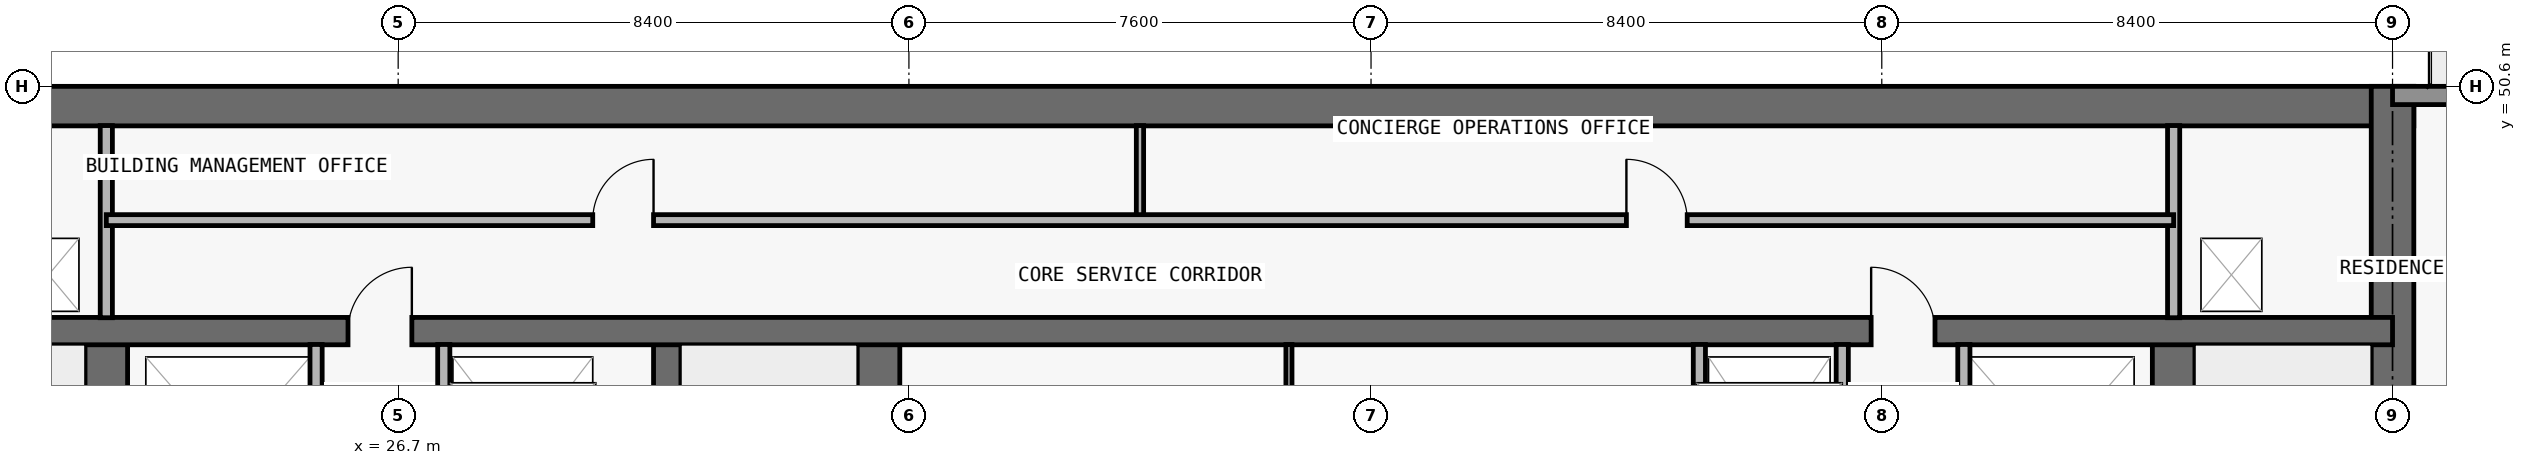
"""IFC4 building model, lengths in metres.
Left out: names, types, materials, properties, quantities, classifications, styles, units other than length and angle.
Written with IfcOpenShell. Run it as: python <this file> out.ifc"""

import sys

from ifc_helpers import new_model, si_unit, direction, frame, frame_2d, origin, place, context, subcontext, project, spatial, rectangle, extrude, element, fill, save


model = new_model("IFC4")
c1 = context("Model", 3, precision=1e-05, world=origin(), true_north=direction((0.0, 1.0)))
c2 = subcontext(c1, "Body", "Model", "MODEL_VIEW")
j1 = project(units=[si_unit("LENGTHUNIT", "METRE"), si_unit("PLANEANGLEUNIT", "RADIAN")], contexts=[c1])
p1 = place(None, origin())
s1 = spatial("IfcSite", under=j1, at=p1, CompositionType="ELEMENT")
p2 = place(p1, origin())
s2 = spatial("IfcBuilding", under=s1, at=p2, CompositionType="ELEMENT")
p3 = place(p2, frame((0.0, 0.0, 198.3)))
s3 = spatial("IfcBuildingStorey", under=s2, at=p3, CompositionType="ELEMENT", Elevation=198.3)
p4 = place(p3, frame((17.95, 50.275, 0.0), z_axis=(0.0, 0.0, 1.0), x_axis=(1.0, 0.0, 0.0)))
e1 = element("IfcWall", 1, at=p4, inside=s3, PredefinedType="SHEAR", context=c2, shape_type="SweptSolid", body=[
    extrude(rectangle(XDim=41.9, YDim=0.65, at=frame_2d((20.95, 0.0))), origin(), (0.0, 0.0, 1.0), 3.05),
])
p5 = place(p3, frame((59.5, 36.65, 0.0), z_axis=(0.0, 0.0, 1.0), x_axis=(0.0, 1.0, 0.0)))
e2 = element("IfcWall", 2, at=p5, inside=s3, PredefinedType="SHEAR", context=c2, shape_type="SweptSolid", body=[
    extrude(rectangle(XDim=13.95, YDim=0.7, at=frame_2d((6.975, 0.0))), origin(), (0.0, 0.0, 1.0), 3.05),
])
p6 = place(p3, frame((21.9, 37.0, 0.0), z_axis=(0.0, 0.0, 1.0), x_axis=(0.0, 1.0, 0.0)))
e3 = element("IfcWall", 3, at=p6, inside=s3, PredefinedType="SHEAR", context=c2, shape_type="SweptSolid", body=[
    extrude(rectangle(XDim=9.575, YDim=0.7, at=frame_2d((4.788, 0.0))), origin(), (0.0, 0.0, 1.0), 3.05),
])
p7 = place(p6, frame((0.55, 0.0, 0.0)))
e4 = element("IfcOpeningElement", 4, at=p7, cuts=e3, PredefinedType="OPENING", context=c2, shape_type="SweptSolid", body=[
    extrude(rectangle(XDim=1.1, YDim=2.15, at=frame_2d((0.55, 1.075))), frame((0.0, 0.36, 0.0), z_axis=(0.0, -1.0, 0.0), x_axis=(1.0, 0.0, 0.0)), (0.0, 0.0, 1.0), 0.72),
])
p8 = place(p3, frame((55.9, 37.0, 0.0), z_axis=(0.0, 0.0, 1.0), x_axis=(0.0, 1.0, 0.0)))
e5 = element("IfcWall", 5, at=p8, inside=s3, PredefinedType="SHEAR", context=c2, shape_type="SweptSolid", body=[
    extrude(rectangle(XDim=9.575, YDim=0.7, at=frame_2d((4.788, 0.0))), origin(), (0.0, 0.0, 1.0), 3.05),
])
p9 = place(p8, frame((0.55, 0.0, 0.0)))
e6 = element("IfcOpeningElement", 6, at=p9, cuts=e5, PredefinedType="OPENING", context=c2, shape_type="SweptSolid", body=[
    extrude(rectangle(XDim=1.1, YDim=2.15, at=frame_2d((0.55, 1.075))), frame((0.0, 0.36, 0.0), z_axis=(0.0, -1.0, 0.0), x_axis=(1.0, 0.0, 0.0)), (0.0, 0.0, 1.0), 0.72),
])
p10 = place(p3, frame((31.125, 37.0, 0.0), z_axis=(0.0, 0.0, 1.0), x_axis=(0.0, 1.0, 0.0)))
e7 = element("IfcWall", 7, at=p10, inside=s3, PredefinedType="SHEAR", context=c2, shape_type="SweptSolid", body=[
    extrude(rectangle(XDim=9.575, YDim=0.45, at=frame_2d((4.788, 0.0))), origin(), (0.0, 0.0, 1.0), 3.05),
])
p11 = place(p3, frame((34.6, 37.0, 0.0), z_axis=(0.0, 0.0, 1.0), x_axis=(0.0, 1.0, 0.0)))
e8 = element("IfcWall", 8, at=p11, inside=s3, PredefinedType="SHEAR", context=c2, shape_type="SweptSolid", body=[
    extrude(rectangle(XDim=9.575, YDim=0.7, at=frame_2d((4.788, 0.0))), origin(), (0.0, 0.0, 1.0), 3.05),
])
p12 = place(p3, frame((18.3, 46.575, 0.0), z_axis=(0.0, 0.0, 1.0), x_axis=(1.0, 0.0, 0.0)))
e9 = element("IfcWall", 9, at=p12, inside=s3, PredefinedType="SHEAR", context=c2, shape_type="SweptSolid", body=[
    extrude(rectangle(XDim=41.2, YDim=0.45, at=frame_2d((20.6, 0.0))), origin(), (0.0, 0.0, 1.0), 3.05),
])
p13 = place(p12, frame((7.575, 0.0, 0.0)))
e10 = element("IfcOpeningElement", 10, at=p13, cuts=e9, PredefinedType="OPENING", context=c2, shape_type="SweptSolid", body=[
    extrude(rectangle(XDim=1.05, YDim=2.15, at=frame_2d((0.525, 1.075))), frame((0.0, 0.235, 0.0), z_axis=(0.0, -1.0, 0.0), x_axis=(1.0, 0.0, 0.0)), (0.0, 0.0, 1.0), 0.47),
])
p14 = place(p12, frame((32.625, 0.0, 0.0)))
e11 = element("IfcOpeningElement", 11, at=p14, cuts=e9, PredefinedType="OPENING", context=c2, shape_type="SweptSolid", body=[
    extrude(rectangle(XDim=1.05, YDim=2.15, at=frame_2d((0.525, 1.075))), frame((0.0, 0.235, 0.0), z_axis=(0.0, -1.0, 0.0), x_axis=(1.0, 0.0, 0.0)), (0.0, 0.0, 1.0), 0.47),
])
p15 = place(p3, frame((59.5, 50.45, 0.0), z_axis=(0.0, 0.0, 1.0), x_axis=(1.0, 0.0, 0.0)))
e12 = element("IfcWall", 12, at=p15, inside=s3, PredefinedType="STANDARD", context=c2, shape_type="SweptSolid", body=[
    extrude(rectangle(XDim=8.2, YDim=0.3, at=frame_2d((4.1, 0.0))), origin(), (0.0, 0.0, 1.0), 3.05),
])
p16 = place(p15, frame((3.1, 0.0, 0.0)))
e13 = element("IfcOpeningElement", 13, at=p16, cuts=e12, PredefinedType="OPENING", context=c2, shape_type="SweptSolid", body=[
    extrude(rectangle(XDim=2.0, YDim=2.3, at=frame_2d((1.0, 1.15))), frame((0.0, 0.16, 0.0), z_axis=(0.0, -1.0, 0.0), x_axis=(1.0, 0.0, 0.0)), (0.0, 0.0, 1.0), 0.32),
])
p17 = place(p3, frame((21.9, 46.795, 0.0), z_axis=(0.0, 0.0, 1.0), x_axis=(0.0, 1.0, 0.0)))
e14 = element("IfcWall", 14, at=p17, inside=s3, PredefinedType="PARTITIONING", context=c2, shape_type="SweptSolid", body=[
    extrude(rectangle(XDim=3.16, YDim=0.2, at=frame_2d((1.58, 0.0))), origin(), (0.0, 0.0, 1.0), 3.05),
])
for number, where, z_axis, x_axis in (
    (15, (25.35, 43.17, 0.0), (0.0, 0.0, 1.0), (0.0, 1.0, 0.0)),
    (16, (27.45, 43.17, 0.0), (0.0, 0.0, 1.0), (0.0, 1.0, 0.0)),
):
    element("IfcWall", number, at=place(p3, frame(where, z_axis=z_axis, x_axis=x_axis)), inside=s3, PredefinedType="PARTITIONING", context=c2, shape_type="SweptSolid", body=[
        extrude(rectangle(XDim=3.185, YDim=0.2, at=frame_2d((1.593, 0.0))), origin(), (0.0, 0.0, 1.0), 3.05),
    ])
p18 = place(p3, frame((38.9, 48.4, 0.0), z_axis=(0.0, 0.0, 1.0), x_axis=(0.0, 1.0, 0.0)))
e17 = element("IfcWall", 17, at=p18, inside=s3, PredefinedType="PARTITIONING", context=c2, shape_type="SweptSolid", body=[
    extrude(rectangle(XDim=1.555, YDim=0.12, at=frame_2d((0.778, 0.0))), origin(), (0.0, 0.0, 1.0), 3.05),
])
p19 = place(p3, frame((41.35, 43.17, 0.0), z_axis=(0.0, 0.0, 1.0), x_axis=(0.0, 1.0, 0.0)))
e18 = element("IfcWall", 18, at=p19, inside=s3, PredefinedType="MOVABLE", context=c2, shape_type="SweptSolid", body=[
    extrude(rectangle(XDim=3.185, YDim=0.1, at=frame_2d((1.593, 0.0))), origin(), (0.0, 0.0, 1.0), 3.05),
])
for number, where, z_axis, x_axis in (
    (19, (48.1, 43.17, 0.0), (0.0, 0.0, 1.0), (0.0, 1.0, 0.0)),
    (20, (50.45, 43.17, 0.0), (0.0, 0.0, 1.0), (0.0, 1.0, 0.0)),
    (21, (52.45, 43.17, 0.0), (0.0, 0.0, 1.0), (0.0, 1.0, 0.0)),
):
    element("IfcWall", number, at=place(p3, frame(where, z_axis=z_axis, x_axis=x_axis)), inside=s3, PredefinedType="PARTITIONING", context=c2, shape_type="SweptSolid", body=[
        extrude(rectangle(XDim=3.185, YDim=0.2, at=frame_2d((1.593, 0.0))), origin(), (0.0, 0.0, 1.0), 3.05),
    ])
p20 = place(p3, frame((55.9, 46.795, 0.0), z_axis=(0.0, 0.0, 1.0), x_axis=(0.0, 1.0, 0.0)))
e22 = element("IfcWall", 22, at=p20, inside=s3, PredefinedType="PARTITIONING", context=c2, shape_type="SweptSolid", body=[
    extrude(rectangle(XDim=3.16, YDim=0.2, at=frame_2d((1.58, 0.0))), origin(), (0.0, 0.0, 1.0), 3.05),
])
p21 = place(p3, frame((21.9, 48.4, 0.0), z_axis=(0.0, 0.0, 1.0), x_axis=(1.0, 0.0, 0.0)))
e23 = element("IfcWall", 23, at=p21, inside=s3, PredefinedType="PARTITIONING", context=c2, shape_type="SweptSolid", body=[
    extrude(rectangle(XDim=34.0, YDim=0.18, at=frame_2d((17.0, 0.0))), origin(), (0.0, 0.0, 1.0), 3.05),
])
p22 = place(p21, frame((8.0, 0.0, 0.0)))
e24 = element("IfcOpeningElement", 24, at=p22, cuts=e23, PredefinedType="OPENING", context=c2, shape_type="SweptSolid", body=[
    extrude(rectangle(XDim=1.0, YDim=2.2, at=frame_2d((0.5, 1.1))), frame((0.0, 0.1, 0.0), z_axis=(0.0, -1.0, 0.0), x_axis=(1.0, 0.0, 0.0)), (0.0, 0.0, 1.0), 0.2),
])
p23 = place(p21, frame((25.0, 0.0, 0.0)))
e25 = element("IfcOpeningElement", 25, at=p23, cuts=e23, PredefinedType="OPENING", context=c2, shape_type="SweptSolid", body=[
    extrude(rectangle(XDim=1.0, YDim=2.2, at=frame_2d((0.5, 1.1))), frame((0.0, 0.1, 0.0), z_axis=(0.0, -1.0, 0.0), x_axis=(1.0, 0.0, 0.0)), (0.0, 0.0, 1.0), 0.2),
])
p24 = place(p13, origin())
e26 = element("IfcDoor", 26, at=p24, inside=s3, OperationType="SINGLE_SWING_RIGHT", PredefinedType="DOOR", context=c2, shape_type="SweptSolid", body=[
    extrude(rectangle(XDim=1.05, YDim=2.15, at=frame_2d((0.525, 1.075))), frame((0.0, 0.025, 0.0), z_axis=(0.0, -1.0, 0.0), x_axis=(1.0, 0.0, 0.0)), (0.0, 0.0, 1.0), 0.05),
])
fill(e10, e26)
p25 = place(p14, origin())
e27 = element("IfcDoor", 27, at=p25, inside=s3, OperationType="SINGLE_SWING_LEFT", PredefinedType="DOOR", context=c2, shape_type="SweptSolid", body=[
    extrude(rectangle(XDim=1.05, YDim=2.15, at=frame_2d((0.525, 1.075))), frame((0.0, 0.025, 0.0), z_axis=(0.0, -1.0, 0.0), x_axis=(1.0, 0.0, 0.0)), (0.0, 0.0, 1.0), 0.05),
])
fill(e11, e27)
p26 = place(p22, origin())
e28 = element("IfcDoor", 28, at=p26, inside=s3, OperationType="SINGLE_SWING_RIGHT", PredefinedType="DOOR", context=c2, shape_type="SweptSolid", body=[
    extrude(rectangle(XDim=1.0, YDim=2.2, at=frame_2d((0.5, 1.1))), frame((0.0, 0.025, 0.0), z_axis=(0.0, -1.0, 0.0), x_axis=(1.0, 0.0, 0.0)), (0.0, 0.0, 1.0), 0.05),
])
fill(e24, e28)
p27 = place(p23, origin())
e29 = element("IfcDoor", 29, at=p27, inside=s3, OperationType="SINGLE_SWING_LEFT", PredefinedType="DOOR", context=c2, shape_type="SweptSolid", body=[
    extrude(rectangle(XDim=1.0, YDim=2.2, at=frame_2d((0.5, 1.1))), frame((0.0, 0.025, 0.0), z_axis=(0.0, -1.0, 0.0), x_axis=(1.0, 0.0, 0.0)), (0.0, 0.0, 1.0), 0.05),
])
fill(e25, e29)
save(model, sys.argv[1])
